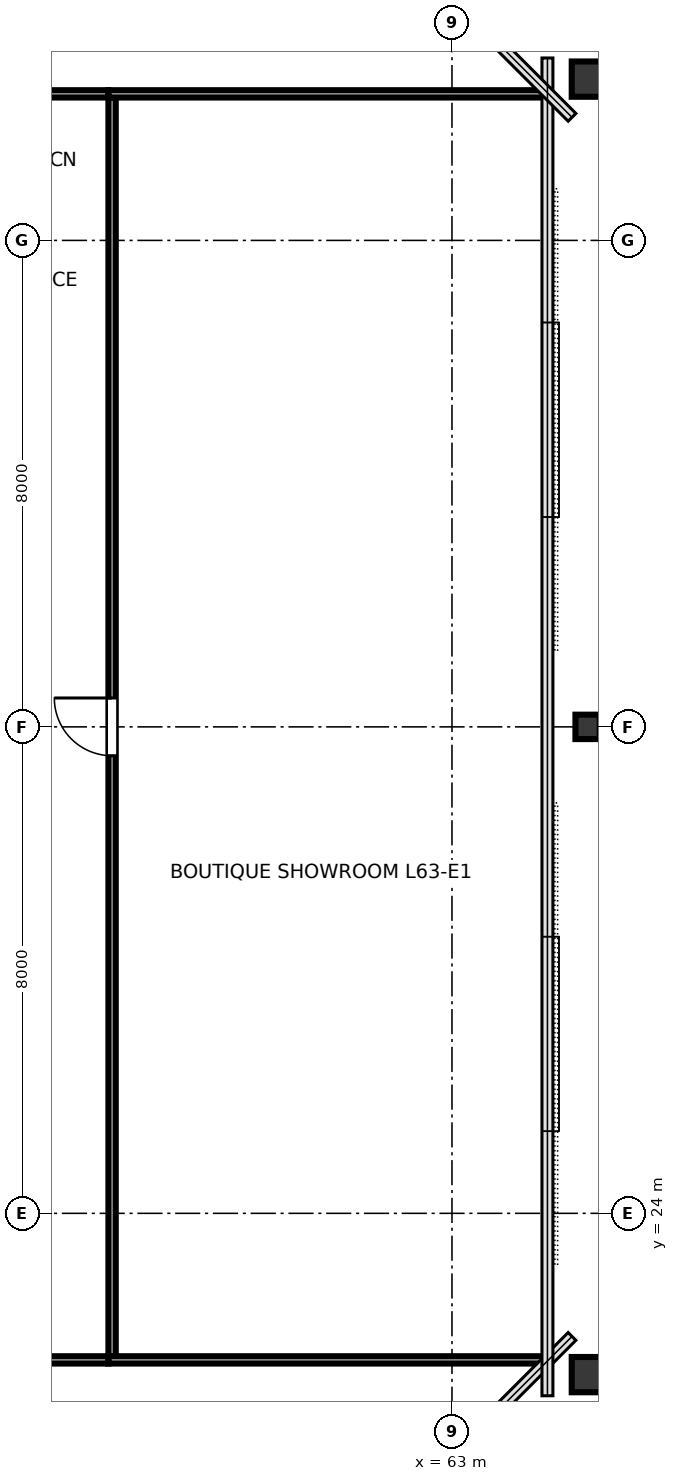
"""IFC4 building model, lengths in metres.
Left out: names, types, materials, properties, quantities, classifications, styles, units other than length and angle.
Written with IfcOpenShell. Run it as: python <this file> out.ifc"""

import sys

from ifc_helpers import new_model, si_unit, direction, frame, frame_2d, origin, origin_2d, place, context, subcontext, project, spatial, rectangle, hollow_rectangle, i_section, extrude, element, fill, save


model = new_model("IFC4")
c1 = context("Model", 3, precision=1e-05, world=origin(), true_north=direction((0.0, 1.0)))
c2 = subcontext(c1, "Body", "Model", "MODEL_VIEW")
j1 = project(units=[si_unit("LENGTHUNIT", "METRE"), si_unit("PLANEANGLEUNIT", "RADIAN")], contexts=[c1])
p1 = place(None, origin())
s1 = spatial("IfcSite", under=j1, at=p1, CompositionType="ELEMENT")
p2 = place(p1, origin())
s2 = spatial("IfcBuilding", under=s1, at=p2, CompositionType="ELEMENT")
p3 = place(p2, frame((0.0, 0.0, 239.4)))
s3 = spatial("IfcBuildingStorey", under=s2, at=p3, CompositionType="ELEMENT", Elevation=239.4)
p4 = place(p3, frame((65.32, 21.348, 0.0), z_axis=(0.0, 0.0, 1.0), x_axis=(0.0, 1.0, 0.0)))
e1 = element("IfcColumn", 1, at=p4, inside=s3, PredefinedType="COLUMN", context=c2, shape_type="SweptSolid", body=[
    extrude(hollow_rectangle(XDim=0.58, YDim=0.7, WallThickness=0.032, at=origin_2d()), origin(), (0.0, 0.0, 1.0), 3.373),
])
p5 = place(p3, frame((65.23, 32.0, 0.0), z_axis=(0.0, 0.0, 1.0), x_axis=(0.0, 1.0, 0.0)))
e2 = element("IfcColumn", 2, at=p5, inside=s3, PredefinedType="COLUMN", context=c2, shape_type="SweptSolid", body=[
    extrude(i_section(OverallWidth=0.401, OverallDepth=0.399, WebThickness=0.025, FlangeThickness=0.04, FilletRadius=0.025, at=origin_2d()), origin(), (0.0, 0.0, 1.0), 3.373),
])
p6 = place(p3, frame((65.32, 42.652, 0.0), z_axis=(0.0, 0.0, 1.0), x_axis=(0.0, 1.0, 0.0)))
e3 = element("IfcColumn", 3, at=p6, inside=s3, PredefinedType="COLUMN", context=c2, shape_type="SweptSolid", body=[
    extrude(hollow_rectangle(XDim=0.58, YDim=0.7, WallThickness=0.032, at=origin_2d()), origin(), (0.0, 0.0, 1.0), 3.373),
])
p7 = place(p3, frame((47.02, 21.59, 0.0), z_axis=(0.0, 0.0, 1.0), x_axis=(1.0, 0.0, 0.0)))
e4 = element("IfcWall", 4, at=p7, inside=s3, PredefinedType="PARTITIONING", context=c2, shape_type="SweptSolid", body=[
    extrude(rectangle(XDim=10.33, YDim=0.12, at=frame_2d((5.165, 0.0))), origin(), (0.0, 0.0, 1.0), 2.655),
])
p8 = place(p7, frame((4.62, 0.0, 0.0)))
e5 = element("IfcOpeningElement", 5, at=p8, cuts=e4, PredefinedType="OPENING", context=c2, shape_type="SweptSolid", body=[
    extrude(rectangle(XDim=0.95, YDim=2.15, at=frame_2d((0.475, 1.075))), frame((0.0, 0.07, 0.0), z_axis=(0.0, -1.0, 0.0), x_axis=(1.0, 0.0, 0.0)), (0.0, 0.0, 1.0), 0.14),
])
p9 = place(p3, frame((47.02, 42.41, 0.0), z_axis=(0.0, 0.0, 1.0), x_axis=(1.0, 0.0, 0.0)))
e6 = element("IfcWall", 6, at=p9, inside=s3, PredefinedType="PARTITIONING", context=c2, shape_type="SweptSolid", body=[
    extrude(rectangle(XDim=10.33, YDim=0.12, at=frame_2d((5.165, 0.0))), origin(), (0.0, 0.0, 1.0), 2.655),
])
p10 = place(p9, frame((0.81, 0.0, 0.0)))
e7 = element("IfcOpeningElement", 7, at=p10, cuts=e6, PredefinedType="OPENING", context=c2, shape_type="SweptSolid", body=[
    extrude(rectangle(XDim=0.95, YDim=2.15, at=frame_2d((0.475, 1.075))), frame((0.0, 0.07, 0.0), z_axis=(0.0, -1.0, 0.0), x_axis=(1.0, 0.0, 0.0)), (0.0, 0.0, 1.0), 0.14),
])
p11 = place(p9, frame((5.905, 0.0, 0.0)))
e8 = element("IfcOpeningElement", 8, at=p11, cuts=e6, PredefinedType="OPENING", context=c2, shape_type="SweptSolid", body=[
    extrude(rectangle(XDim=0.95, YDim=2.15, at=frame_2d((0.475, 1.075))), frame((0.0, 0.07, 0.0), z_axis=(0.0, -1.0, 0.0), x_axis=(1.0, 0.0, 0.0)), (0.0, 0.0, 1.0), 0.14),
])
p12 = place(p3, frame((57.41, 21.65, 0.0), z_axis=(0.0, 0.0, 1.0), x_axis=(0.0, 1.0, 0.0)))
e9 = element("IfcWall", 9, at=p12, inside=s3, PredefinedType="PARTITIONING", context=c2, shape_type="SweptSolid", body=[
    extrude(rectangle(XDim=20.7, YDim=0.12, at=frame_2d((10.35, 0.0))), origin(), (0.0, 0.0, 1.0), 2.655),
])
p13 = place(p12, frame((9.875, 0.0, 0.0)))
e10 = element("IfcOpeningElement", 10, at=p13, cuts=e9, PredefinedType="OPENING", context=c2, shape_type="SweptSolid", body=[
    extrude(rectangle(XDim=0.95, YDim=2.15, at=frame_2d((0.475, 1.075))), frame((0.0, 0.07, 0.0), z_axis=(0.0, -1.0, 0.0), x_axis=(1.0, 0.0, 0.0)), (0.0, 0.0, 1.0), 0.14),
])
for number, where, z_axis, x_axis in (
    (11, (57.35, 21.59, 0.0), (0.0, 0.0, 1.0), (1.0, 0.0, 0.0)),
    (12, (57.35, 42.41, 0.0), (0.0, 0.0, 1.0), (1.0, 0.0, 0.0)),
):
    element("IfcWall", number, at=place(p3, frame(where, z_axis=z_axis, x_axis=x_axis)), inside=s3, PredefinedType="PARTITIONING", context=c2, shape_type="SweptSolid", body=[
        extrude(rectangle(XDim=7.22, YDim=0.12, at=frame_2d((3.61, 0.0))), origin(), (0.0, 0.0, 1.0), 2.655),
    ])
p14 = place(p13, origin())
e13 = element("IfcDoor", 13, at=p14, inside=s3, OperationType="SINGLE_SWING_RIGHT", PredefinedType="DOOR", context=c2, shape_type="SweptSolid", body=[
    extrude(rectangle(XDim=0.95, YDim=2.15, at=frame_2d((0.475, 1.075))), frame((0.0, 0.025, 0.0), z_axis=(0.0, -1.0, 0.0), x_axis=(1.0, 0.0, 0.0)), (0.0, 0.0, 1.0), 0.05),
])
fill(e10, e13)
save(model, sys.argv[1])
